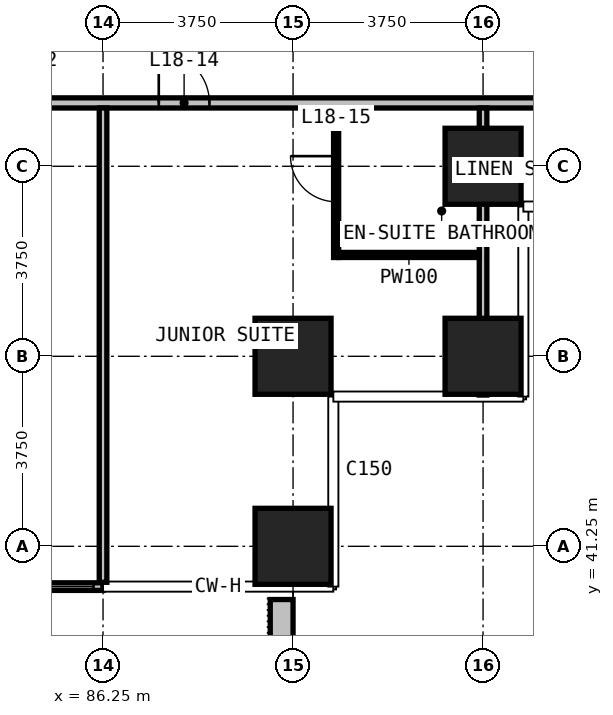
"""IFC4 building model, lengths in metres.
Left out: names, types, materials, properties, quantities, classifications, styles, units other than length and angle.
Written with IfcOpenShell. Run it as: python <this file> out.ifc"""

import sys

from ifc_helpers import new_model, si_unit, direction, frame, frame_2d, origin, origin_2d, place, context, subcontext, project, spatial, rectangle, extrude, element, fill, save


model = new_model("IFC4")
c1 = context("Model", 3, precision=1e-05, world=origin(), true_north=direction((0.0, 1.0)))
c2 = subcontext(c1, "Body", "Model", "MODEL_VIEW")
j1 = project(units=[si_unit("LENGTHUNIT", "METRE"), si_unit("PLANEANGLEUNIT", "RADIAN")], contexts=[c1])
p1 = place(None, origin())
s1 = spatial("IfcSite", under=j1, at=p1, CompositionType="ELEMENT")
p2 = place(p1, origin())
s2 = spatial("IfcBuilding", under=s1, at=p2, CompositionType="ELEMENT")
p3 = place(p2, frame((0.0, 0.0, 79.1)))
s3 = spatial("IfcBuildingStorey", under=s2, at=p3, CompositionType="ELEMENT", Elevation=79.1)
for number, where, z_axis, x_axis in (
    (1, (90.0, 41.25, 0.0), (0.0, 0.0, 1.0), (1.0, 0.0, 0.0)),
    (2, (90.0, 45.0, 0.0), (0.0, 0.0, 1.0), (1.0, 0.0, 0.0)),
    (3, (93.75, 45.0, 0.0), (0.0, 0.0, 1.0), (1.0, 0.0, 0.0)),
    (4, (93.75, 48.75, 0.0), (0.0, 0.0, 1.0), (1.0, 0.0, 0.0)),
):
    element("IfcColumn", number, at=place(p3, frame(where, z_axis=z_axis, x_axis=x_axis)), inside=s3, PredefinedType="COLUMN", context=c2, shape_type="SweptSolid", body=[
        extrude(rectangle(XDim=1.5, YDim=1.5, at=origin_2d()), origin(), (0.0, 0.0, 1.0), 3.3),
    ])
p4 = place(p3, frame((82.5, 40.455, 0.0), z_axis=(0.0, 0.0, 1.0), x_axis=(1.0, 0.0, 0.0)))
e5 = element("IfcWall", 5, at=p4, inside=s3, PredefinedType="SOLIDWALL", context=c2, shape_type="SweptSolid", body=[
    extrude(rectangle(XDim=3.75, YDim=0.15, at=frame_2d((1.875, 0.0))), origin(), (0.0, 0.0, 1.0), 3.0),
])
p5 = place(p4, frame((1.275, 0.0, 0.0)))
e6 = element("IfcOpeningElement", 6, at=p5, cuts=e5, PredefinedType="OPENING", context=c2, shape_type="SweptSolid", body=[
    extrude(rectangle(XDim=1.2, YDim=2.4, at=frame_2d((0.6, 1.2))), frame((0.0, 0.085, 0.0), z_axis=(0.0, -1.0, 0.0), x_axis=(1.0, 0.0, 0.0)), (0.0, 0.0, 1.0), 0.17),
])
p6 = place(p4, frame((2.663, 0.0, 0.1)))
e7 = element("IfcOpeningElement", 7, at=p6, cuts=e5, PredefinedType="OPENING", context=c2, shape_type="SweptSolid", body=[
    extrude(rectangle(XDim=0.9, YDim=2.4, at=frame_2d((0.45, 1.2))), frame((0.0, 0.085, 0.0), z_axis=(0.0, -1.0, 0.0), x_axis=(1.0, 0.0, 0.0)), (0.0, 0.0, 1.0), 0.17),
])
p7 = place(p3, frame((89.775, 40.2, 0.0), z_axis=(0.0, 0.0, 1.0), x_axis=(0.0, -1.0, 0.0)))
e8 = element("IfcWall", 8, at=p7, inside=s3, PredefinedType="USERDEFINED", context=c2, shape_type="SweptSolid", body=[
    extrude(rectangle(XDim=2.35, YDim=0.45, at=frame_2d((1.175, 0.0))), origin(), (0.0, 0.0, 1.0), 1.1),
])
p8 = place(p3, frame((51.735, 50.0, 0.0), z_axis=(0.0, 0.0, 1.0), x_axis=(1.0, 0.0, 0.0)))
e9 = element("IfcWall", 9, at=p8, inside=s3, PredefinedType="PARTITIONING", context=c2, shape_type="SweptSolid", body=[
    extrude(rectangle(XDim=46.53, YDim=0.2, at=frame_2d((23.265, 0.0))), origin(), (0.0, 0.0, 1.0), 3.0),
])
p9 = place(p8, frame((5.615, 0.0, 0.0)))
e10 = element("IfcOpeningElement", 10, at=p9, cuts=e9, PredefinedType="OPENING", context=c2, shape_type="SweptSolid", body=[
    extrude(rectangle(XDim=1.0, YDim=2.2, at=frame_2d((0.5, 1.1))), frame((0.0, 0.11, 0.0), z_axis=(0.0, -1.0, 0.0), x_axis=(1.0, 0.0, 0.0)), (0.0, 0.0, 1.0), 0.22),
])
p10 = place(p8, frame((17.415, 0.0, 0.0)))
e11 = element("IfcOpeningElement", 11, at=p10, cuts=e9, PredefinedType="OPENING", context=c2, shape_type="SweptSolid", body=[
    extrude(rectangle(XDim=1.0, YDim=2.2, at=frame_2d((0.5, 1.1))), frame((0.0, 0.11, 0.0), z_axis=(0.0, -1.0, 0.0), x_axis=(1.0, 0.0, 0.0)), (0.0, 0.0, 1.0), 0.22),
])
p11 = place(p8, frame((20.615, 0.0, 0.0)))
e12 = element("IfcOpeningElement", 12, at=p11, cuts=e9, PredefinedType="OPENING", context=c2, shape_type="SweptSolid", body=[
    extrude(rectangle(XDim=1.0, YDim=2.2, at=frame_2d((0.5, 1.1))), frame((0.0, 0.11, 0.0), z_axis=(0.0, -1.0, 0.0), x_axis=(1.0, 0.0, 0.0)), (0.0, 0.0, 1.0), 0.22),
])
p12 = place(p8, frame((32.415, 0.0, 0.0)))
e13 = element("IfcOpeningElement", 13, at=p12, cuts=e9, PredefinedType="OPENING", context=c2, shape_type="SweptSolid", body=[
    extrude(rectangle(XDim=1.0, YDim=2.2, at=frame_2d((0.5, 1.1))), frame((0.0, 0.11, 0.0), z_axis=(0.0, -1.0, 0.0), x_axis=(1.0, 0.0, 0.0)), (0.0, 0.0, 1.0), 0.22),
])
p13 = place(p8, frame((35.615, 0.0, 0.0)))
e14 = element("IfcOpeningElement", 14, at=p13, cuts=e9, PredefinedType="OPENING", context=c2, shape_type="SweptSolid", body=[
    extrude(rectangle(XDim=1.0, YDim=2.2, at=frame_2d((0.5, 1.1))), frame((0.0, 0.11, 0.0), z_axis=(0.0, -1.0, 0.0), x_axis=(1.0, 0.0, 0.0)), (0.0, 0.0, 1.0), 0.22),
])
p14 = place(p8, frame((1.8, 0.0, 0.0)))
e15 = element("IfcOpeningElement", 15, at=p14, cuts=e9, PredefinedType="OPENING", context=c2, shape_type="SweptSolid", body=[
    extrude(rectangle(XDim=0.9, YDim=2.2, at=frame_2d((0.45, 1.1))), frame((0.0, 0.11, 0.0), z_axis=(0.0, -1.0, 0.0), x_axis=(1.0, 0.0, 0.0)), (0.0, 0.0, 1.0), 0.22),
])
p15 = place(p8, frame((43.815, 0.0, 0.0)))
e16 = element("IfcOpeningElement", 16, at=p15, cuts=e9, PredefinedType="OPENING", context=c2, shape_type="SweptSolid", body=[
    extrude(rectangle(XDim=0.9, YDim=2.2, at=frame_2d((0.45, 1.1))), frame((0.0, 0.11, 0.0), z_axis=(0.0, -1.0, 0.0), x_axis=(1.0, 0.0, 0.0)), (0.0, 0.0, 1.0), 0.22),
])
p16 = place(p3, frame((86.25, 40.54, 0.0), z_axis=(0.0, 0.0, 1.0), x_axis=(0.0, 1.0, 0.0)))
e17 = element("IfcWall", 17, at=p16, inside=s3, PredefinedType="PARTITIONING", context=c2, shape_type="SweptSolid", body=[
    extrude(rectangle(XDim=9.36, YDim=0.15, at=frame_2d((4.68, 0.0))), origin(), (0.0, 0.0, 1.0), 3.0),
])
p17 = place(p3, frame((93.75, 44.235, 0.0), z_axis=(0.0, 0.0, 1.0), x_axis=(0.0, 1.0, 0.0)))
e18 = element("IfcWall", 18, at=p17, inside=s3, PredefinedType="PARTITIONING", context=c2, shape_type="SweptSolid", body=[
    extrude(rectangle(XDim=5.665, YDim=0.15, at=frame_2d((2.833, 0.0))), origin(), (0.0, 0.0, 1.0), 3.0),
])
p18 = place(p3, frame((90.9, 47.0, 0.0), z_axis=(0.0, 0.0, 1.0), x_axis=(1.0, 0.0, 0.0)))
e19 = element("IfcWall", 19, at=p18, inside=s3, PredefinedType="PARTITIONING", context=c2, shape_type="SweptSolid", body=[
    extrude(rectangle(XDim=2.775, YDim=0.1, at=frame_2d((1.388, 0.0))), origin(), (0.0, 0.0, 1.0), 3.0),
])
p19 = place(p3, frame((90.85, 46.95, 0.0), z_axis=(0.0, 0.0, 1.0), x_axis=(0.0, 1.0, 0.0)))
e20 = element("IfcWall", 20, at=p19, inside=s3, PredefinedType="PARTITIONING", context=c2, shape_type="SweptSolid", body=[
    extrude(rectangle(XDim=2.95, YDim=0.1, at=frame_2d((1.475, 0.0))), origin(), (0.0, 0.0, 1.0), 3.0),
])
p20 = place(p19, frame((1.1, 0.0, 0.0)))
e21 = element("IfcOpeningElement", 21, at=p20, cuts=e20, PredefinedType="OPENING", context=c2, shape_type="SweptSolid", body=[
    extrude(rectangle(XDim=0.9, YDim=2.2, at=frame_2d((0.45, 1.1))), frame((0.0, 0.06, 0.0), z_axis=(0.0, -1.0, 0.0), x_axis=(1.0, 0.0, 0.0)), (0.0, 0.0, 1.0), 0.12),
])
p21 = place(p6, origin())
e22 = element("IfcWindow", 22, at=p21, inside=s3, PartitioningType="SINGLE_PANEL", PredefinedType="WINDOW", context=c2, shape_type="SweptSolid", body=[
    extrude(rectangle(XDim=0.9, YDim=2.4, at=frame_2d((0.45, 1.2))), frame((0.0, 0.03, 0.0), z_axis=(0.0, -1.0, 0.0), x_axis=(1.0, 0.0, 0.0)), (0.0, 0.0, 1.0), 0.06),
])
fill(e7, e22)
p22 = place(p13, origin())
e23 = element("IfcDoor", 23, at=p22, inside=s3, OperationType="SINGLE_SWING_RIGHT", PredefinedType="DOOR", context=c2, shape_type="SweptSolid", body=[
    extrude(rectangle(XDim=1.0, YDim=2.2, at=frame_2d((0.5, 1.1))), frame((0.0, 0.025, 0.0), z_axis=(0.0, -1.0, 0.0), x_axis=(1.0, 0.0, 0.0)), (0.0, 0.0, 1.0), 0.05),
])
fill(e14, e23)
p23 = place(p20, origin())
e24 = element("IfcDoor", 24, at=p23, inside=s3, OperationType="SINGLE_SWING_RIGHT", PredefinedType="DOOR", context=c2, shape_type="SweptSolid", body=[
    extrude(rectangle(XDim=0.9, YDim=2.2, at=frame_2d((0.45, 1.1))), frame((0.0, 0.025, 0.0), z_axis=(0.0, -1.0, 0.0), x_axis=(1.0, 0.0, 0.0)), (0.0, 0.0, 1.0), 0.05),
])
fill(e21, e24)
save(model, sys.argv[1])
